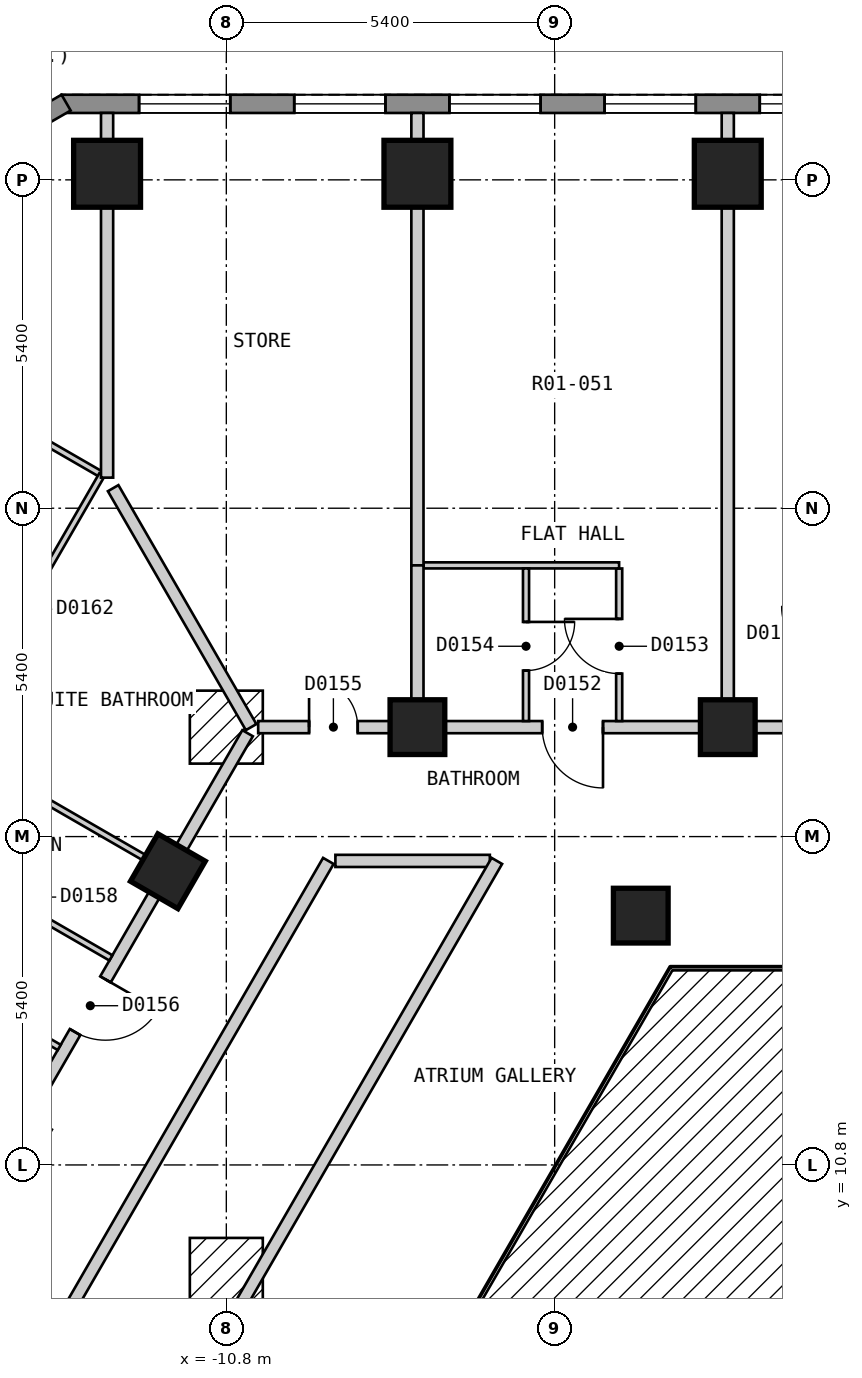
"""IFC4 building model, lengths in metres.
Left out: names, types, materials, properties, quantities, classifications, styles, units other than length and angle.
Written with IfcOpenShell. Run it as: python <this file> out.ifc"""

import sys

from ifc_helpers import new_model, si_unit, direction, frame, frame_2d, origin, origin_2d, place, context, subcontext, project, spatial, polyline, rectangle, outline, extrude, element, fill, save


model = new_model("IFC4")
c1 = context("Model", 3, precision=1e-05, world=origin(), true_north=direction((0.0, 1.0)))
c2 = subcontext(c1, "Body", "Model", "MODEL_VIEW")
j1 = project(units=[si_unit("LENGTHUNIT", "METRE"), si_unit("PLANEANGLEUNIT", "RADIAN")], contexts=[c1])
p1 = place(None, origin())
s1 = spatial("IfcSite", under=j1, at=p1, CompositionType="ELEMENT")
p2 = place(p1, origin())
s2 = spatial("IfcBuilding", under=s1, at=p2, CompositionType="ELEMENT")
p3 = place(p2, frame((0.0, 0.0, 23.4)))
s3 = spatial("IfcBuildingStorey", under=s2, at=p3, CompositionType="ELEMENT", Elevation=23.4)
for number, where, z_axis, x_axis in (
    (1, (-2.553, 27.1, 0.0), (0.0, 0.0, 1.0), (-1.0, 0.0, 0.0)),
    (2, (-7.657, 27.1, 0.0), (0.0, 0.0, 1.0), (-1.0, 0.0, 0.0)),
    (3, (-12.761, 27.1, 0.0), (0.0, 0.0, 1.0), (-1.0, 0.0, 0.0)),
):
    element("IfcColumn", number, at=place(p3, frame(where, z_axis=z_axis, x_axis=x_axis)), inside=s3, PredefinedType="COLUMN", context=c2, shape_type="SweptSolid", body=[
        extrude(rectangle(XDim=1.1, YDim=1.1, at=origin_2d()), origin(), (0.0, 0.0, 1.0), 3.0),
    ])
for number, where, z_axis, x_axis in (
    (4, (-2.553, 18.0, 0.0), (0.0, 0.0, 1.0), (-1.0, 0.0, 0.0)),
    (5, (-3.984, 14.9, 0.0), (0.0, 0.0, 1.0), (1.0, 0.0, 0.0)),
    (6, (-7.657, 18.0, 0.0), (0.0, 0.0, 1.0), (-1.0, 0.0, 0.0)),
    (7, (-11.761, 15.63, 0.0), (0.0, 0.0, 1.0), (-0.5, -0.866, 0.0)),
):
    element("IfcColumn", number, at=place(p3, frame(where, z_axis=z_axis, x_axis=x_axis)), inside=s3, PredefinedType="COLUMN", context=c2, shape_type="SweptSolid", body=[
        extrude(rectangle(XDim=0.9, YDim=0.9, at=origin_2d()), origin(), (0.0, 0.0, 1.0), 3.0),
    ])
p4 = place(p3, frame((13.51, 28.25, 0.0), z_axis=(0.0, 0.0, 1.0), x_axis=(-1.0, 0.0, 0.0)))
e8 = element("IfcWall", 8, at=p4, inside=s3, PredefinedType="SOLIDWALL", context=c2, shape_type="SweptSolid", body=[
    extrude(outline(polyline([(0.0, -0.15), (27.02, -0.15), (26.94, 0.15), (0.08, 0.15), (0.0, -0.15)])), origin(), (0.0, 0.0, 1.0), 2.7),
])
p5 = place(p4, frame((1.277, 0.0, 0.15)))
e9 = element("IfcOpeningElement", 9, at=p5, cuts=e8, PredefinedType="OPENING", context=c2, shape_type="SweptSolid", body=[
    extrude(rectangle(XDim=1.5, YDim=2.1, at=frame_2d((0.75, 1.05))), frame((0.0, 0.16, 0.0), z_axis=(0.0, -1.0, 0.0), x_axis=(1.0, 0.0, 0.0)), (0.0, 0.0, 1.0), 0.32),
])
p6 = place(p4, frame((3.829, 0.0, 0.15)))
e10 = element("IfcOpeningElement", 10, at=p6, cuts=e8, PredefinedType="OPENING", context=c2, shape_type="SweptSolid", body=[
    extrude(rectangle(XDim=1.5, YDim=2.1, at=frame_2d((0.75, 1.05))), frame((0.0, 0.16, 0.0), z_axis=(0.0, -1.0, 0.0), x_axis=(1.0, 0.0, 0.0)), (0.0, 0.0, 1.0), 0.32),
])
p7 = place(p4, frame((6.381, 0.0, 0.15)))
e11 = element("IfcOpeningElement", 11, at=p7, cuts=e8, PredefinedType="OPENING", context=c2, shape_type="SweptSolid", body=[
    extrude(rectangle(XDim=1.5, YDim=2.1, at=frame_2d((0.75, 1.05))), frame((0.0, 0.16, 0.0), z_axis=(0.0, -1.0, 0.0), x_axis=(1.0, 0.0, 0.0)), (0.0, 0.0, 1.0), 0.32),
])
p8 = place(p4, frame((8.933, 0.0, 0.15)))
e12 = element("IfcOpeningElement", 12, at=p8, cuts=e8, PredefinedType="OPENING", context=c2, shape_type="SweptSolid", body=[
    extrude(rectangle(XDim=1.5, YDim=2.1, at=frame_2d((0.75, 1.05))), frame((0.0, 0.16, 0.0), z_axis=(0.0, -1.0, 0.0), x_axis=(1.0, 0.0, 0.0)), (0.0, 0.0, 1.0), 0.32),
])
p9 = place(p4, frame((11.485, 0.0, 0.15)))
e13 = element("IfcOpeningElement", 13, at=p9, cuts=e8, PredefinedType="OPENING", context=c2, shape_type="SweptSolid", body=[
    extrude(rectangle(XDim=1.5, YDim=2.1, at=frame_2d((0.75, 1.05))), frame((0.0, 0.16, 0.0), z_axis=(0.0, -1.0, 0.0), x_axis=(1.0, 0.0, 0.0)), (0.0, 0.0, 1.0), 0.32),
])
p10 = place(p4, frame((14.037, 0.0, 0.15)))
e14 = element("IfcOpeningElement", 14, at=p10, cuts=e8, PredefinedType="OPENING", context=c2, shape_type="SweptSolid", body=[
    extrude(rectangle(XDim=1.5, YDim=2.1, at=frame_2d((0.75, 1.05))), frame((0.0, 0.16, 0.0), z_axis=(0.0, -1.0, 0.0), x_axis=(1.0, 0.0, 0.0)), (0.0, 0.0, 1.0), 0.32),
])
p11 = place(p4, frame((16.589, 0.0, 0.15)))
e15 = element("IfcOpeningElement", 15, at=p11, cuts=e8, PredefinedType="OPENING", context=c2, shape_type="SweptSolid", body=[
    extrude(rectangle(XDim=1.5, YDim=2.1, at=frame_2d((0.75, 1.05))), frame((0.0, 0.16, 0.0), z_axis=(0.0, -1.0, 0.0), x_axis=(1.0, 0.0, 0.0)), (0.0, 0.0, 1.0), 0.32),
])
p12 = place(p4, frame((19.141, 0.0, 0.15)))
e16 = element("IfcOpeningElement", 16, at=p12, cuts=e8, PredefinedType="OPENING", context=c2, shape_type="SweptSolid", body=[
    extrude(rectangle(XDim=1.5, YDim=2.1, at=frame_2d((0.75, 1.05))), frame((0.0, 0.16, 0.0), z_axis=(0.0, -1.0, 0.0), x_axis=(1.0, 0.0, 0.0)), (0.0, 0.0, 1.0), 0.32),
])
p13 = place(p4, frame((21.693, 0.0, 0.15)))
e17 = element("IfcOpeningElement", 17, at=p13, cuts=e8, PredefinedType="OPENING", context=c2, shape_type="SweptSolid", body=[
    extrude(rectangle(XDim=1.5, YDim=2.1, at=frame_2d((0.75, 1.05))), frame((0.0, 0.16, 0.0), z_axis=(0.0, -1.0, 0.0), x_axis=(1.0, 0.0, 0.0)), (0.0, 0.0, 1.0), 0.32),
])
p14 = place(p4, frame((24.245, 0.0, 0.15)))
e18 = element("IfcOpeningElement", 18, at=p14, cuts=e8, PredefinedType="OPENING", context=c2, shape_type="SweptSolid", body=[
    extrude(rectangle(XDim=1.5, YDim=2.1, at=frame_2d((0.75, 1.05))), frame((0.0, 0.16, 0.0), z_axis=(0.0, -1.0, 0.0), x_axis=(1.0, 0.0, 0.0)), (0.0, 0.0, 1.0), 0.32),
])
p15 = place(p3, frame((-13.435, 28.27, 0.0), z_axis=(0.0, 0.0, 1.0), x_axis=(-0.866010750942, -0.50002537861, 0.0)))
e19 = element("IfcWall", 19, at=p15, inside=s3, PredefinedType="SOLIDWALL", context=c2, shape_type="SweptSolid", body=[
    extrude(outline(polyline([(0.0, -0.15), (5.0, -0.15), (4.919, 0.15), (0.08, 0.15), (0.0, -0.15)])), origin(), (0.0, 0.0, 1.0), 2.7),
])
p16 = place(p15, frame((0.65, 0.0, 0.15)))
e20 = element("IfcOpeningElement", 20, at=p16, cuts=e19, PredefinedType="OPENING", context=c2, shape_type="SweptSolid", body=[
    extrude(rectangle(XDim=1.2, YDim=2.1, at=frame_2d((0.6, 1.05))), frame((0.0, 0.16, 0.0), z_axis=(0.0, -1.0, 0.0), x_axis=(1.0, 0.0, 0.0)), (0.0, 0.0, 1.0), 0.32),
])
p17 = place(p15, frame((3.149, 0.0, 0.15)))
e21 = element("IfcOpeningElement", 21, at=p17, cuts=e19, PredefinedType="OPENING", context=c2, shape_type="SweptSolid", body=[
    extrude(rectangle(XDim=1.2, YDim=2.1, at=frame_2d((0.6, 1.05))), frame((0.0, 0.16, 0.0), z_axis=(0.0, -1.0, 0.0), x_axis=(1.0, 0.0, 0.0)), (0.0, 0.0, 1.0), 0.32),
])
p18 = place(p3, frame((-9.006, 15.8, 0.0), z_axis=(0.0, 0.0, 1.0), x_axis=(1.0, 0.0, 0.0)))
e22 = element("IfcWall", 22, at=p18, inside=s3, PredefinedType="PARTITIONING", context=c2, shape_type="SweptSolid", body=[
    extrude(rectangle(XDim=2.54, YDim=0.2, at=frame_2d((1.27, 0.0))), origin(), (0.0, 0.0, 1.0), 2.7),
])
p19 = place(p3, frame((-10.276, 18.0, 0.0), z_axis=(0.0, 0.0, 1.0), x_axis=(1.0, 0.0, 0.0)))
e23 = element("IfcWall", 23, at=p19, inside=s3, PredefinedType="PARTITIONING", context=c2, shape_type="SweptSolid", body=[
    extrude(rectangle(XDim=20.61, YDim=0.2, at=frame_2d((10.305, 0.0))), origin(), (0.0, 0.0, 1.0), 2.7),
])
p20 = place(p19, frame((14.879, 0.0, 0.0)))
e24 = element("IfcOpeningElement", 24, at=p20, cuts=e23, PredefinedType="OPENING", context=c2, shape_type="SweptSolid", body=[
    extrude(rectangle(XDim=1.0, YDim=2.1, at=frame_2d((0.5, 1.05))), frame((0.0, 0.11, 0.0), z_axis=(0.0, -1.0, 0.0), x_axis=(1.0, 0.0, 0.0)), (0.0, 0.0, 1.0), 0.22),
])
p21 = place(p19, frame((9.775, 0.0, 0.0)))
e25 = element("IfcOpeningElement", 25, at=p21, cuts=e23, PredefinedType="OPENING", context=c2, shape_type="SweptSolid", body=[
    extrude(rectangle(XDim=1.0, YDim=2.1, at=frame_2d((0.5, 1.05))), frame((0.0, 0.11, 0.0), z_axis=(0.0, -1.0, 0.0), x_axis=(1.0, 0.0, 0.0)), (0.0, 0.0, 1.0), 0.22),
])
p22 = place(p19, frame((4.671, 0.0, 0.0)))
e26 = element("IfcOpeningElement", 26, at=p22, cuts=e23, PredefinedType="OPENING", context=c2, shape_type="SweptSolid", body=[
    extrude(rectangle(XDim=1.0, YDim=2.1, at=frame_2d((0.5, 1.05))), frame((0.0, 0.11, 0.0), z_axis=(0.0, -1.0, 0.0), x_axis=(1.0, 0.0, 0.0)), (0.0, 0.0, 1.0), 0.22),
])
p23 = place(p19, frame((0.837, 0.0, 0.0)))
e27 = element("IfcOpeningElement", 27, at=p23, cuts=e23, PredefinedType="OPENING", context=c2, shape_type="SweptSolid", body=[
    extrude(rectangle(XDim=0.8, YDim=2.1, at=frame_2d((0.4, 1.05))), frame((0.0, 0.11, 0.0), z_axis=(0.0, -1.0, 0.0), x_axis=(1.0, 0.0, 0.0)), (0.0, 0.0, 1.0), 0.22),
])
p24 = place(p3, frame((-10.854, 8.0, 0.0), z_axis=(0.0, 0.0, 1.0), x_axis=(0.499964141897, 0.86604610548, 0.0)))
e28 = element("IfcWall", 28, at=p24, inside=s3, PredefinedType="PARTITIONING", context=c2, shape_type="SweptSolid", body=[
    extrude(rectangle(XDim=9.007, YDim=0.2, at=frame_2d((4.503, 0.0))), origin(), (0.0, 0.0, 1.0), 2.7),
])
p25 = place(p3, frame((-18.244, -0.001, 0.0), z_axis=(0.0, 0.0, 1.0), x_axis=(0.499962999376, 0.866046765051, 0.0)))
e29 = element("IfcWall", 29, at=p25, inside=s3, PredefinedType="PARTITIONING", context=c2, shape_type="SweptSolid", body=[
    extrude(rectangle(XDim=18.245, YDim=0.2, at=frame_2d((9.123, 0.0))), origin(), (0.0, 0.0, 1.0), 2.7),
])
p26 = place(p25, frame((8.672, 0.0, 0.0)))
e30 = element("IfcOpeningElement", 30, at=p26, cuts=e29, PredefinedType="OPENING", context=c2, shape_type="SweptSolid", body=[
    extrude(rectangle(XDim=0.9, YDim=2.1, at=frame_2d((0.45, 1.05))), frame((0.0, 0.11, 0.0), z_axis=(0.0, -1.0, 0.0), x_axis=(1.0, 0.0, 0.0)), (0.0, 0.0, 1.0), 0.22),
])
p27 = place(p3, frame((-20.727, 0.099, 0.0), z_axis=(0.0, 0.0, 1.0), x_axis=(0.499993204491, 0.866029327138, 0.0)))
e31 = element("IfcWall", 31, at=p27, inside=s3, PredefinedType="PARTITIONING", context=c2, shape_type="SweptSolid", body=[
    extrude(rectangle(XDim=20.554, YDim=0.2, at=frame_2d((10.277, 0.0))), origin(), (0.0, 0.0, 1.0), 2.7),
])
p28 = place(p27, frame((14.88, 0.0, 0.0)))
e32 = element("IfcOpeningElement", 32, at=p28, cuts=e31, PredefinedType="OPENING", context=c2, shape_type="SweptSolid", body=[
    extrude(rectangle(XDim=1.0, YDim=2.1, at=frame_2d((0.5, 1.05))), frame((0.0, 0.11, 0.0), z_axis=(0.0, -1.0, 0.0), x_axis=(1.0, 0.0, 0.0)), (0.0, 0.0, 1.0), 0.22),
])
p29 = place(p27, frame((4.673, 0.0, 0.0)))
e33 = element("IfcOpeningElement", 33, at=p29, cuts=e31, PredefinedType="OPENING", context=c2, shape_type="SweptSolid", body=[
    extrude(rectangle(XDim=1.0, YDim=2.1, at=frame_2d((0.5, 1.05))), frame((0.0, 0.11, 0.0), z_axis=(0.0, -1.0, 0.0), x_axis=(1.0, 0.0, 0.0)), (0.0, 0.0, 1.0), 0.22),
])
p30 = place(p3, frame((-4.339, 20.609, 0.0), z_axis=(0.0, 0.0, 1.0), x_axis=(0.0, -1.0, 0.0)))
e34 = element("IfcWall", 34, at=p30, inside=s3, PredefinedType="PARTITIONING", context=c2, shape_type="SweptSolid", body=[
    extrude(rectangle(XDim=2.509, YDim=0.1, at=frame_2d((1.254, 0.0))), origin(), (0.0, 0.0, 1.0), 2.7),
])
p31 = place(p30, frame((0.829, 0.0, 0.0)))
e35 = element("IfcOpeningElement", 35, at=p31, cuts=e34, PredefinedType="OPENING", context=c2, shape_type="SweptSolid", body=[
    extrude(rectangle(XDim=0.9, YDim=2.1, at=frame_2d((0.45, 1.05))), frame((0.0, 0.06, 0.0), z_axis=(0.0, -1.0, 0.0), x_axis=(1.0, 0.0, 0.0)), (0.0, 0.0, 1.0), 0.12),
])
p32 = place(p3, frame((-17.056, 14.758, 0.0), z_axis=(0.0, 0.0, 1.0), x_axis=(0.866035025835, -0.499983333749, 0.0)))
e36 = element("IfcWall", 36, at=p32, inside=s3, PredefinedType="PARTITIONING", context=c2, shape_type="SweptSolid", body=[
    extrude(rectangle(XDim=4.051, YDim=0.1, at=frame_2d((2.025, 0.0))), origin(), (0.0, 0.0, 1.0), 2.7),
])
p33 = place(p32, frame((1.65, 0.0, 0.0)))
e37 = element("IfcOpeningElement", 37, at=p33, cuts=e36, PredefinedType="OPENING", context=c2, shape_type="SweptSolid", body=[
    extrude(rectangle(XDim=0.8, YDim=2.1, at=frame_2d((0.4, 1.05))), frame((0.0, 0.06, 0.0), z_axis=(0.0, -1.0, 0.0), x_axis=(1.0, 0.0, 0.0)), (0.0, 0.0, 1.0), 0.12),
])
p34 = place(p3, frame((-16.206, 16.23, 0.0), z_axis=(0.0, 0.0, 1.0), x_axis=(0.866076189179, -0.499912026797, 0.0)))
e38 = element("IfcWall", 38, at=p34, inside=s3, PredefinedType="PARTITIONING", context=c2, shape_type="SweptSolid", body=[
    extrude(rectangle(XDim=4.051, YDim=0.1, at=frame_2d((2.025, 0.0))), origin(), (0.0, 0.0, 1.0), 2.7),
])
p35 = place(p34, frame((1.6, 0.0, 0.0)))
e39 = element("IfcOpeningElement", 39, at=p35, cuts=e38, PredefinedType="OPENING", context=c2, shape_type="SweptSolid", body=[
    extrude(rectangle(XDim=0.9, YDim=2.1, at=frame_2d((0.45, 1.05))), frame((0.0, 0.06, 0.0), z_axis=(0.0, -1.0, 0.0), x_axis=(1.0, 0.0, 0.0)), (0.0, 0.0, 1.0), 0.12),
])
p36 = place(p3, frame((-17.955, 25.099, 0.0), z_axis=(0.0, 0.0, 1.0), x_axis=(0.866069217599, -0.499924104568, 0.0)))
e40 = element("IfcWall", 40, at=p36, inside=s3, PredefinedType="PARTITIONING", context=c2, shape_type="SweptSolid", body=[
    extrude(rectangle(XDim=5.869, YDim=0.1, at=frame_2d((2.935, 0.0))), origin(), (0.0, 0.0, 1.0), 2.7),
])
p37 = place(p36, frame((2.51, 0.0, 0.0)))
e41 = element("IfcOpeningElement", 41, at=p37, cuts=e40, PredefinedType="OPENING", context=c2, shape_type="SweptSolid", body=[
    extrude(rectangle(XDim=0.9, YDim=2.1, at=frame_2d((0.45, 1.05))), frame((0.0, 0.06, 0.0), z_axis=(0.0, -1.0, 0.0), x_axis=(1.0, 0.0, 0.0)), (0.0, 0.0, 1.0), 0.12),
])
p38 = place(p3, frame((-7.557, 20.66, 0.0), z_axis=(0.0, 0.0, 1.0), x_axis=(1.0, 0.0, 0.0)))
e42 = element("IfcWall", 42, at=p38, inside=s3, PredefinedType="PARTITIONING", context=c2, shape_type="SweptSolid", body=[
    extrude(rectangle(XDim=3.217, YDim=0.1, at=frame_2d((1.608, 0.0))), origin(), (0.0, 0.0, 1.0), 2.7),
])
p39 = place(p3, frame((-17.9, 13.395, 0.0), z_axis=(0.0, 0.0, 1.0), x_axis=(0.499949632511, 0.866054481515, 0.0)))
e43 = element("IfcWall", 43, at=p39, inside=s3, PredefinedType="PARTITIONING", context=c2, shape_type="SweptSolid", body=[
    extrude(rectangle(XDim=10.109, YDim=0.1, at=frame_2d((5.054, 0.0))), origin(), (0.0, 0.0, 1.0), 2.7),
])
p40 = place(p39, frame((2.002, 0.0, 0.0)))
e44 = element("IfcOpeningElement", 44, at=p40, cuts=e43, PredefinedType="OPENING", context=c2, shape_type="SweptSolid", body=[
    extrude(rectangle(XDim=0.9, YDim=2.1, at=frame_2d((0.45, 1.05))), frame((0.0, 0.06, 0.0), z_axis=(0.0, -1.0, 0.0), x_axis=(1.0, 0.0, 0.0)), (0.0, 0.0, 1.0), 0.12),
])
p41 = place(p39, frame((7.156, 0.0, 0.0)))
e45 = element("IfcOpeningElement", 45, at=p41, cuts=e43, PredefinedType="OPENING", context=c2, shape_type="SweptSolid", body=[
    extrude(rectangle(XDim=0.8, YDim=2.1, at=frame_2d((0.4, 1.05))), frame((0.0, 0.06, 0.0), z_axis=(0.0, -1.0, 0.0), x_axis=(1.0, 0.0, 0.0)), (0.0, 0.0, 1.0), 0.12),
])
p42 = place(p3, frame((-5.871, 18.1, 0.0), z_axis=(0.0, 0.0, 1.0), x_axis=(0.0, 1.0, 0.0)))
e46 = element("IfcWall", 46, at=p42, inside=s3, PredefinedType="PARTITIONING", context=c2, shape_type="SweptSolid", body=[
    extrude(rectangle(XDim=2.51, YDim=0.1, at=frame_2d((1.255, 0.0))), origin(), (0.0, 0.0, 1.0), 2.7),
])
p43 = place(p42, frame((0.83, 0.0, 0.0)))
e47 = element("IfcOpeningElement", 47, at=p43, cuts=e46, PredefinedType="OPENING", context=c2, shape_type="SweptSolid", body=[
    extrude(rectangle(XDim=0.8, YDim=2.1, at=frame_2d((0.4, 1.05))), frame((0.0, 0.06, 0.0), z_axis=(0.0, -1.0, 0.0), x_axis=(1.0, 0.0, 0.0)), (0.0, 0.0, 1.0), 0.12),
])
p44 = place(p3, frame((-12.661, 21.93, 0.0), z_axis=(0.0, 0.0, 1.0), x_axis=(0.499975495332, -0.866039551099, 0.0)))
e48 = element("IfcWall", 48, at=p44, inside=s3, PredefinedType="PARTITIONING", context=c2, shape_type="SweptSolid", body=[
    extrude(rectangle(XDim=4.538, YDim=0.2, at=frame_2d((2.269, 0.0))), origin(), (0.0, 0.0, 1.0), 2.7),
])
p45 = place(p3, frame((-7.657, 28.1, 0.0), z_axis=(0.0, 0.0, 1.0), x_axis=(0.0, -1.0, 0.0)))
e49 = element("IfcWall", 49, at=p45, inside=s3, PredefinedType="PARTITIONING", context=c2, shape_type="SweptSolid", body=[
    extrude(rectangle(XDim=7.44, YDim=0.2, at=frame_2d((3.72, 0.0))), origin(), (0.0, 0.0, 1.0), 2.7),
])
p46 = place(p3, frame((-2.553, 28.1, 0.0), z_axis=(0.0, 0.0, 1.0), x_axis=(0.0, -1.0, 0.0)))
e50 = element("IfcWall", 50, at=p46, inside=s3, PredefinedType="PARTITIONING", context=c2, shape_type="SweptSolid", body=[
    extrude(rectangle(XDim=10.0, YDim=0.2, at=frame_2d((5.0, 0.0))), origin(), (0.0, 0.0, 1.0), 2.7),
])
p47 = place(p3, frame((-7.657, 18.1, 0.0), z_axis=(0.0, 0.0, 1.0), x_axis=(0.0, 1.0, 0.0)))
e51 = element("IfcWall", 51, at=p47, inside=s3, PredefinedType="PARTITIONING", context=c2, shape_type="SweptSolid", body=[
    extrude(rectangle(XDim=2.56, YDim=0.2, at=frame_2d((1.28, 0.0))), origin(), (0.0, 0.0, 1.0), 2.7),
])
p48 = place(p3, frame((-12.761, 22.103, 0.0), z_axis=(0.0, 0.0, 1.0), x_axis=(0.0, 1.0, 0.0)))
e52 = element("IfcWall", 52, at=p48, inside=s3, PredefinedType="PARTITIONING", context=c2, shape_type="SweptSolid", body=[
    extrude(rectangle(XDim=5.997, YDim=0.2, at=frame_2d((2.999, 0.0))), origin(), (0.0, 0.0, 1.0), 2.7),
])
p49 = place(p3, frame((-15.398, 17.729, 0.0), z_axis=(0.0, 0.0, 1.0), x_axis=(0.866039832988, -0.499975007054, 0.0)))
e53 = element("IfcWall", 53, at=p49, inside=s3, PredefinedType="PARTITIONING", context=c2, shape_type="SweptSolid", body=[
    extrude(rectangle(XDim=4.1, YDim=0.1, at=frame_2d((2.05, 0.0))), origin(), (0.0, 0.0, 1.0), 2.7),
])
p50 = place(p10, origin())
e54 = element("IfcWindow", 54, at=p50, inside=s3, PartitioningType="SINGLE_PANEL", PredefinedType="WINDOW", context=c2, shape_type="SweptSolid", body=[
    extrude(rectangle(XDim=1.5, YDim=2.1, at=frame_2d((0.75, 1.05))), frame((0.0, 0.03, 0.0), z_axis=(0.0, -1.0, 0.0), x_axis=(1.0, 0.0, 0.0)), (0.0, 0.0, 1.0), 0.06),
])
fill(e14, e54)
p51 = place(p11, origin())
e55 = element("IfcWindow", 55, at=p51, inside=s3, PartitioningType="SINGLE_PANEL", PredefinedType="WINDOW", context=c2, shape_type="SweptSolid", body=[
    extrude(rectangle(XDim=1.5, YDim=2.1, at=frame_2d((0.75, 1.05))), frame((0.0, 0.03, 0.0), z_axis=(0.0, -1.0, 0.0), x_axis=(1.0, 0.0, 0.0)), (0.0, 0.0, 1.0), 0.06),
])
fill(e15, e55)
p52 = place(p12, origin())
e56 = element("IfcWindow", 56, at=p52, inside=s3, PartitioningType="SINGLE_PANEL", PredefinedType="WINDOW", context=c2, shape_type="SweptSolid", body=[
    extrude(rectangle(XDim=1.5, YDim=2.1, at=frame_2d((0.75, 1.05))), frame((0.0, 0.03, 0.0), z_axis=(0.0, -1.0, 0.0), x_axis=(1.0, 0.0, 0.0)), (0.0, 0.0, 1.0), 0.06),
])
fill(e16, e56)
p53 = place(p13, origin())
e57 = element("IfcWindow", 57, at=p53, inside=s3, PartitioningType="SINGLE_PANEL", PredefinedType="WINDOW", context=c2, shape_type="SweptSolid", body=[
    extrude(rectangle(XDim=1.5, YDim=2.1, at=frame_2d((0.75, 1.05))), frame((0.0, 0.03, 0.0), z_axis=(0.0, -1.0, 0.0), x_axis=(1.0, 0.0, 0.0)), (0.0, 0.0, 1.0), 0.06),
])
fill(e17, e57)
p54 = place(p14, origin())
e58 = element("IfcWindow", 58, at=p54, inside=s3, PartitioningType="SINGLE_PANEL", PredefinedType="WINDOW", context=c2, shape_type="SweptSolid", body=[
    extrude(rectangle(XDim=1.5, YDim=2.1, at=frame_2d((0.75, 1.05))), frame((0.0, 0.03, 0.0), z_axis=(0.0, -1.0, 0.0), x_axis=(1.0, 0.0, 0.0)), (0.0, 0.0, 1.0), 0.06),
])
fill(e18, e58)
p55 = place(p22, origin())
e59 = element("IfcDoor", 59, at=p55, inside=s3, OperationType="SINGLE_SWING_RIGHT", PredefinedType="DOOR", context=c2, shape_type="SweptSolid", body=[
    extrude(rectangle(XDim=1.0, YDim=2.1, at=frame_2d((0.5, 1.05))), frame((0.0, 0.025, 0.0), z_axis=(0.0, -1.0, 0.0), x_axis=(1.0, 0.0, 0.0)), (0.0, 0.0, 1.0), 0.05),
])
fill(e26, e59)
p56 = place(p31, origin())
e60 = element("IfcDoor", 60, at=p56, inside=s3, OperationType="SINGLE_SWING_LEFT", PredefinedType="DOOR", context=c2, shape_type="SweptSolid", body=[
    extrude(rectangle(XDim=0.9, YDim=2.1, at=frame_2d((0.45, 1.05))), frame((0.0, 0.025, 0.0), z_axis=(0.0, -1.0, 0.0), x_axis=(1.0, 0.0, 0.0)), (0.0, 0.0, 1.0), 0.05),
])
fill(e35, e60)
p57 = place(p43, origin())
e61 = element("IfcDoor", 61, at=p57, inside=s3, OperationType="SINGLE_SWING_RIGHT", PredefinedType="DOOR", context=c2, shape_type="SweptSolid", body=[
    extrude(rectangle(XDim=0.8, YDim=2.1, at=frame_2d((0.4, 1.05))), frame((0.0, 0.025, 0.0), z_axis=(0.0, -1.0, 0.0), x_axis=(1.0, 0.0, 0.0)), (0.0, 0.0, 1.0), 0.05),
])
fill(e47, e61)
p58 = place(p23, origin())
e62 = element("IfcDoor", 62, at=p58, inside=s3, OperationType="SINGLE_SWING_LEFT", PredefinedType="DOOR", context=c2, shape_type="SweptSolid", body=[
    extrude(rectangle(XDim=0.8, YDim=2.1, at=frame_2d((0.4, 1.05))), frame((0.0, 0.025, 0.0), z_axis=(0.0, -1.0, 0.0), x_axis=(1.0, 0.0, 0.0)), (0.0, 0.0, 1.0), 0.05),
])
fill(e27, e62)
p59 = place(p28, origin())
e63 = element("IfcDoor", 63, at=p59, inside=s3, OperationType="SINGLE_SWING_RIGHT", PredefinedType="DOOR", context=c2, shape_type="SweptSolid", body=[
    extrude(rectangle(XDim=1.0, YDim=2.1, at=frame_2d((0.5, 1.05))), frame((0.0, 0.025, 0.0), z_axis=(0.0, -1.0, 0.0), x_axis=(1.0, 0.0, 0.0)), (0.0, 0.0, 1.0), 0.05),
])
fill(e32, e63)
save(model, sys.argv[1])
